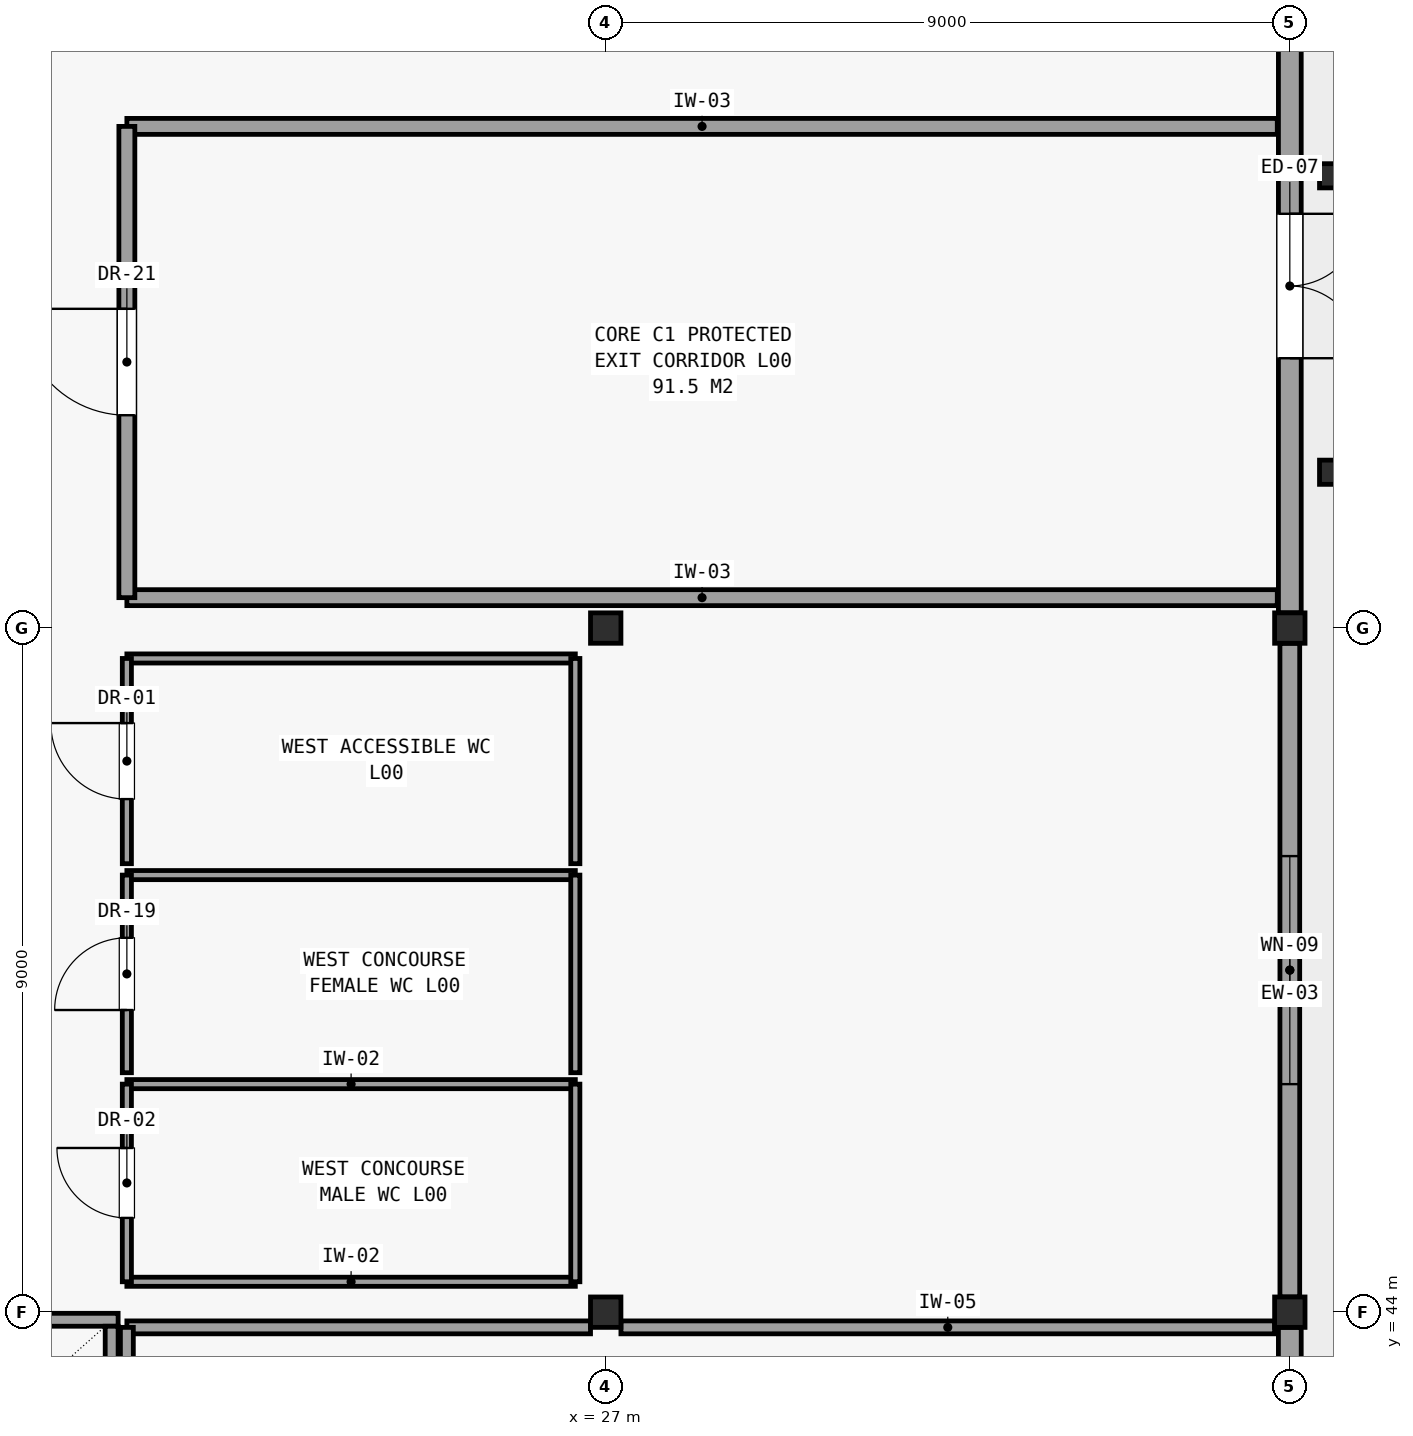
"""IFC4 building model, lengths in metres.
Left out: names, types, materials, properties, quantities, classifications, styles, units other than length and angle.
Written with IfcOpenShell. Run it as: python <this file> out.ifc"""

import sys

from ifc_helpers import new_model, si_unit, direction, frame, frame_2d, origin, origin_2d, place, context, subcontext, project, spatial, rectangle, hollow_rectangle, hollow_circle, extrude, element, fill, save


model = new_model("IFC4")
c1 = context("Model", 3, precision=1e-05, world=origin(), true_north=direction((0.0, 1.0)))
c2 = subcontext(c1, "Body", "Model", "MODEL_VIEW")
j1 = project(units=[si_unit("LENGTHUNIT", "METRE"), si_unit("PLANEANGLEUNIT", "RADIAN")], contexts=[c1])
p1 = place(None, origin())
s1 = spatial("IfcSite", under=j1, at=p1, CompositionType="ELEMENT")
p2 = place(p1, origin())
s2 = spatial("IfcBuilding", under=s1, at=p2, CompositionType="ELEMENT")
p3 = place(p2, origin())
s3 = spatial("IfcBuildingStorey", under=s2, at=p3, CompositionType="ELEMENT", Elevation=0.0)
for number, where, z_axis, x_axis in (
    (1, (27.0, 44.0, 0.0), (0.0, 0.0, 1.0), (1.0, 0.0, 0.0)),
    (2, (27.0, 53.0, 0.0), (0.0, 0.0, 1.0), (1.0, 0.0, 0.0)),
    (3, (36.0, 44.0, 0.0), (0.0, 0.0, 1.0), (1.0, 0.0, 0.0)),
    (4, (36.0, 53.0, 0.0), (0.0, 0.0, 1.0), (1.0, 0.0, 0.0)),
):
    element("IfcColumn", number, at=place(p3, frame(where, z_axis=z_axis, x_axis=x_axis)), inside=s3, PredefinedType="COLUMN", context=c2, shape_type="SweptSolid", body=[
        extrude(hollow_rectangle(XDim=0.4, YDim=0.4, WallThickness=0.019, at=origin_2d()), origin(), (0.0, 0.0, 1.0), 5.1),
    ])
for number, where, z_axis, x_axis in (
    (5, (36.55, 55.05, 0.0), (0.0, 0.0, 1.0), (1.0, 0.0, 0.0)),
    (6, (36.55, 58.95, 0.0), (0.0, 0.0, 1.0), (1.0, 0.0, 0.0)),
):
    element("IfcColumn", number, at=place(p3, frame(where, z_axis=z_axis, x_axis=x_axis)), inside=s3, PredefinedType="COLUMN", context=c2, shape_type="SweptSolid", body=[
        extrude(hollow_circle(Radius=0.159, WallThickness=0.01, at=origin_2d()), origin(), (0.0, 0.0, 1.0), 5.1),
    ])
p4 = place(p3, frame((36.0, 36.2, 0.0), z_axis=(0.0, 0.0, 1.0), x_axis=(0.0, 1.0, 0.0)))
e7 = element("IfcWall", 7, at=p4, inside=s3, PredefinedType="SOLIDWALL", context=c2, shape_type="SweptSolid", body=[
    extrude(rectangle(XDim=7.6, YDim=0.3, at=frame_2d((3.8, 0.0))), origin(), (0.0, 0.0, 1.0), 4.262),
])
p5 = place(p4, frame((4.7, 0.0, 0.0), z_axis=(0.0, 0.0, 1.0), x_axis=(-1.0, 0.0, 0.0)))
e8 = element("IfcOpeningElement", 8, at=p5, cuts=e7, PredefinedType="OPENING", context=c2, shape_type="SweptSolid", body=[
    extrude(rectangle(XDim=1.8, YDim=2.5, at=frame_2d((0.9, 1.25))), frame((0.0, 0.161, 0.0), z_axis=(0.0, -1.0, 0.0), x_axis=(1.0, 0.0, 0.0)), (0.0, 0.0, 1.0), 0.322),
])
p6 = place(p3, frame((36.0, 44.2, 0.0), z_axis=(0.0, 0.0, 1.0), x_axis=(0.0, 1.0, 0.0)))
e9 = element("IfcWall", 9, at=p6, inside=s3, PredefinedType="SOLIDWALL", context=c2, shape_type="SweptSolid", body=[
    extrude(rectangle(XDim=8.6, YDim=0.26, at=frame_2d((4.3, 0.0))), origin(), (0.0, 0.0, 1.0), 4.262),
])
p7 = place(p6, frame((2.8, 0.0, 0.95)))
e10 = element("IfcOpeningElement", 10, at=p7, cuts=e9, PredefinedType="OPENING", context=c2, shape_type="SweptSolid", body=[
    extrude(rectangle(XDim=3.0, YDim=1.4, at=frame_2d((1.5, 0.7))), frame((0.0, 0.141, 0.0), z_axis=(0.0, -1.0, 0.0), x_axis=(1.0, 0.0, 0.0)), (0.0, 0.0, 1.0), 0.282),
])
p8 = place(p3, frame((36.0, 53.2, 0.0), z_axis=(0.0, 0.0, 1.0), x_axis=(0.0, 1.0, 0.0)))
e11 = element("IfcWall", 11, at=p8, inside=s3, PredefinedType="SOLIDWALL", context=c2, shape_type="SweptSolid", body=[
    extrude(rectangle(XDim=8.6, YDim=0.3, at=frame_2d((4.3, 0.0))), origin(), (0.0, 0.0, 1.0), 4.262),
])
p9 = place(p8, frame((5.25, 0.0, 0.0), z_axis=(0.0, 0.0, 1.0), x_axis=(-1.0, 0.0, 0.0)))
e12 = element("IfcOpeningElement", 12, at=p9, cuts=e11, PredefinedType="OPENING", context=c2, shape_type="SweptSolid", body=[
    extrude(rectangle(XDim=1.9, YDim=2.4, at=frame_2d((0.95, 1.2))), frame((0.0, 0.161, 0.0), z_axis=(0.0, -1.0, 0.0), x_axis=(1.0, 0.0, 0.0)), (0.0, 0.0, 1.0), 0.322),
])
p10 = place(p3, frame((18.415, 43.9, 0.0), z_axis=(0.0, 0.0, 1.0), x_axis=(1.0, 0.0, 0.0)))
e13 = element("IfcWall", 13, at=p10, inside=s3, PredefinedType="PARTITIONING", context=c2, shape_type="SweptSolid", body=[
    extrude(rectangle(XDim=2.17, YDim=0.17, at=frame_2d((1.085, 0.0))), origin(), (0.0, 0.0, 1.0), 4.262),
])
p11 = place(p3, frame((20.5, 42.185, 0.0), z_axis=(0.0, 0.0, 1.0), x_axis=(0.0, 1.0, 0.0)))
e14 = element("IfcWall", 14, at=p11, inside=s3, PredefinedType="PARTITIONING", context=c2, shape_type="SweptSolid", body=[
    extrude(rectangle(XDim=1.63, YDim=0.17, at=frame_2d((0.815, 0.0))), origin(), (0.0, 0.0, 1.0), 4.262),
])
for number, where, z_axis, x_axis in (
    (15, (20.7, 44.4, 0.0), (0.0, 0.0, 1.0), (1.0, 0.0, 0.0)),
    (16, (20.7, 47.0, 0.0), (0.0, 0.0, 1.0), (1.0, 0.0, 0.0)),
):
    element("IfcWall", number, at=place(p3, frame(where, z_axis=z_axis, x_axis=x_axis)), inside=s3, PredefinedType="PARTITIONING", context=c2, shape_type="SweptSolid", body=[
        extrude(rectangle(XDim=5.9, YDim=0.12, at=frame_2d((2.95, 0.0))), origin(), (0.0, 0.0, 1.0), 4.85),
    ])
p12 = place(p3, frame((20.7, 44.4, 0.0), z_axis=(0.0, 0.0, 1.0), x_axis=(0.0, 1.0, 0.0)))
e17 = element("IfcWall", 17, at=p12, inside=s3, PredefinedType="PARTITIONING", context=c2, shape_type="SweptSolid", body=[
    extrude(rectangle(XDim=2.6, YDim=0.12, at=frame_2d((1.3, 0.0))), origin(), (0.0, 0.0, 1.0), 4.85),
])
p13 = place(p12, frame((0.84, 0.0, 0.0)))
e18 = element("IfcOpeningElement", 18, at=p13, cuts=e17, PredefinedType="OPENING", context=c2, shape_type="SweptSolid", body=[
    extrude(rectangle(XDim=0.92, YDim=2.1, at=frame_2d((0.46, 1.05))), frame((0.0, 0.071, 0.0), z_axis=(0.0, -1.0, 0.0), x_axis=(1.0, 0.0, 0.0)), (0.0, 0.0, 1.0), 0.142),
])
p14 = place(p3, frame((26.6, 44.4, 0.0), z_axis=(0.0, 0.0, 1.0), x_axis=(0.0, 1.0, 0.0)))
e19 = element("IfcWall", 19, at=p14, inside=s3, PredefinedType="PARTITIONING", context=c2, shape_type="SweptSolid", body=[
    extrude(rectangle(XDim=2.6, YDim=0.12, at=frame_2d((1.3, 0.0))), origin(), (0.0, 0.0, 1.0), 4.85),
])
p15 = place(p3, frame((20.7, 49.75, 0.0), z_axis=(0.0, 0.0, 1.0), x_axis=(1.0, 0.0, 0.0)))
e20 = element("IfcWall", 20, at=p15, inside=s3, PredefinedType="PARTITIONING", context=c2, shape_type="SweptSolid", body=[
    extrude(rectangle(XDim=5.9, YDim=0.12, at=frame_2d((2.95, 0.0))), origin(), (0.0, 0.0, 1.0), 4.85),
])
p16 = place(p3, frame((20.7, 47.15, 0.0), z_axis=(0.0, 0.0, 1.0), x_axis=(0.0, 1.0, 0.0)))
e21 = element("IfcWall", 21, at=p16, inside=s3, PredefinedType="PARTITIONING", context=c2, shape_type="SweptSolid", body=[
    extrude(rectangle(XDim=2.6, YDim=0.12, at=frame_2d((1.3, 0.0))), origin(), (0.0, 0.0, 1.0), 4.6),
])
p17 = place(p16, frame((0.825, 0.0, 0.0)))
e22 = element("IfcOpeningElement", 22, at=p17, cuts=e21, PredefinedType="OPENING", context=c2, shape_type="SweptSolid", body=[
    extrude(rectangle(XDim=0.95, YDim=2.15, at=frame_2d((0.475, 1.075))), frame((0.0, 0.071, 0.0), z_axis=(0.0, -1.0, 0.0), x_axis=(1.0, 0.0, 0.0)), (0.0, 0.0, 1.0), 0.142),
])
p18 = place(p3, frame((26.6, 47.15, 0.0), z_axis=(0.0, 0.0, 1.0), x_axis=(0.0, 1.0, 0.0)))
e23 = element("IfcWall", 23, at=p18, inside=s3, PredefinedType="PARTITIONING", context=c2, shape_type="SweptSolid", body=[
    extrude(rectangle(XDim=2.6, YDim=0.12, at=frame_2d((1.3, 0.0))), origin(), (0.0, 0.0, 1.0), 4.6),
])
p19 = place(p3, frame((20.7, 52.6, 0.0), z_axis=(0.0, 0.0, 1.0), x_axis=(1.0, 0.0, 0.0)))
e24 = element("IfcWall", 24, at=p19, inside=s3, PredefinedType="PARTITIONING", context=c2, shape_type="SweptSolid", body=[
    extrude(rectangle(XDim=5.9, YDim=0.12, at=frame_2d((2.95, 0.0))), origin(), (0.0, 0.0, 1.0), 4.85),
])
p20 = place(p3, frame((20.7, 49.9, 0.0), z_axis=(0.0, 0.0, 1.0), x_axis=(0.0, 1.0, 0.0)))
e25 = element("IfcWall", 25, at=p20, inside=s3, PredefinedType="PARTITIONING", context=c2, shape_type="SweptSolid", body=[
    extrude(rectangle(XDim=2.7, YDim=0.12, at=frame_2d((1.35, 0.0))), origin(), (0.0, 0.0, 1.0), 4.85),
])
p21 = place(p20, frame((0.85, 0.0, 0.0)))
e26 = element("IfcOpeningElement", 26, at=p21, cuts=e25, PredefinedType="OPENING", context=c2, shape_type="SweptSolid", body=[
    extrude(rectangle(XDim=1.0, YDim=2.15, at=frame_2d((0.5, 1.075))), frame((0.0, 0.071, 0.0), z_axis=(0.0, -1.0, 0.0), x_axis=(1.0, 0.0, 0.0)), (0.0, 0.0, 1.0), 0.142),
])
p22 = place(p3, frame((26.6, 49.9, 0.0), z_axis=(0.0, 0.0, 1.0), x_axis=(0.0, 1.0, 0.0)))
e27 = element("IfcWall", 27, at=p22, inside=s3, PredefinedType="PARTITIONING", context=c2, shape_type="SweptSolid", body=[
    extrude(rectangle(XDim=2.7, YDim=0.12, at=frame_2d((1.35, 0.0))), origin(), (0.0, 0.0, 1.0), 4.85),
])
p23 = place(p3, frame((20.7, 43.8, 0.0), z_axis=(0.0, 0.0, 1.0), x_axis=(1.0, 0.0, 0.0)))
e28 = element("IfcWall", 28, at=p23, inside=s3, PredefinedType="PARTITIONING", context=c2, shape_type="SweptSolid", body=[
    extrude(rectangle(XDim=6.1, YDim=0.17, at=frame_2d((3.05, 0.0))), origin(), (0.0, 0.0, 1.0), 4.262),
])
p24 = place(p3, frame((27.2, 43.8, 0.0), z_axis=(0.0, 0.0, 1.0), x_axis=(1.0, 0.0, 0.0)))
e29 = element("IfcWall", 29, at=p24, inside=s3, PredefinedType="PARTITIONING", context=c2, shape_type="SweptSolid", body=[
    extrude(rectangle(XDim=8.6, YDim=0.17, at=frame_2d((4.3, 0.0))), origin(), (0.0, 0.0, 1.0), 4.262),
])
p25 = place(p3, frame((20.7, 36.2, 0.0), z_axis=(0.0, 0.0, 1.0), x_axis=(0.0, 1.0, 0.0)))
e30 = element("IfcWall", 30, at=p25, inside=s3, PredefinedType="PARTITIONING", context=c2, shape_type="SweptSolid", body=[
    extrude(rectangle(XDim=7.6, YDim=0.17, at=frame_2d((3.8, 0.0))), origin(), (0.0, 0.0, 1.0), 4.262),
])
p26 = place(p25, frame((2.96, 0.0, 0.0)))
e31 = element("IfcOpeningElement", 31, at=p26, cuts=e30, PredefinedType="OPENING", context=c2, shape_type="SweptSolid", body=[
    extrude(rectangle(XDim=1.28, YDim=2.3, at=frame_2d((0.64, 1.15))), frame((0.0, 0.096, 0.0), z_axis=(0.0, -1.0, 0.0), x_axis=(1.0, 0.0, 0.0)), (0.0, 0.0, 1.0), 0.192),
])
for number, where, z_axis, x_axis in (
    (32, (20.7, 53.4, 0.0), (0.0, 0.0, 1.0), (1.0, 0.0, 0.0)),
    (33, (20.7, 59.6, 0.0), (0.0, 0.0, 1.0), (1.0, 0.0, 0.0)),
):
    element("IfcWall", number, at=place(p3, frame(where, z_axis=z_axis, x_axis=x_axis)), inside=s3, PredefinedType="PARTITIONING", context=c2, shape_type="SweptSolid", body=[
        extrude(rectangle(XDim=15.135, YDim=0.21, at=frame_2d((7.567, 0.0))), origin(), (0.0, 0.0, 1.0), 4.362),
    ])
p27 = place(p3, frame((20.7, 53.4, 0.0), z_axis=(0.0, 0.0, 1.0), x_axis=(0.0, 1.0, 0.0)))
e34 = element("IfcWall", 34, at=p27, inside=s3, PredefinedType="PARTITIONING", context=c2, shape_type="SweptSolid", body=[
    extrude(rectangle(XDim=6.2, YDim=0.21, at=frame_2d((3.1, 0.0))), origin(), (0.0, 0.0, 1.0), 4.6),
])
p28 = place(p27, frame((2.4, 0.0, 0.0)))
e35 = element("IfcOpeningElement", 35, at=p28, cuts=e34, PredefinedType="OPENING", context=c2, shape_type="SweptSolid", body=[
    extrude(rectangle(XDim=1.4, YDim=2.2, at=frame_2d((0.7, 1.1))), frame((0.0, 0.116, 0.0), z_axis=(0.0, -1.0, 0.0), x_axis=(1.0, 0.0, 0.0)), (0.0, 0.0, 1.0), 0.232),
])
p29 = place(p7, origin())
e36 = element("IfcWindow", 36, at=p29, inside=s3, PartitioningType="SINGLE_PANEL", PredefinedType="WINDOW", context=c2, shape_type="SweptSolid", body=[
    extrude(rectangle(XDim=3.0, YDim=1.4, at=frame_2d((1.5, 0.7))), frame((0.0, 0.03, 0.0), z_axis=(0.0, -1.0, 0.0), x_axis=(1.0, 0.0, 0.0)), (0.0, 0.0, 1.0), 0.06),
])
fill(e10, e36)
p30 = place(p9, origin())
e37 = element("IfcDoor", 37, at=p30, inside=s3, OperationType="SINGLE_SWING_LEFT", PredefinedType="DOOR", context=c2, shape_type="SweptSolid", body=[
    extrude(rectangle(XDim=1.9, YDim=2.4, at=frame_2d((0.95, 1.2))), frame((0.0, 0.025, 0.0), z_axis=(0.0, -1.0, 0.0), x_axis=(1.0, 0.0, 0.0)), (0.0, 0.0, 1.0), 0.05),
])
fill(e12, e37)
p31 = place(p13, origin())
e38 = element("IfcDoor", 38, at=p31, inside=s3, OperationType="SINGLE_SWING_RIGHT", PredefinedType="DOOR", context=c2, shape_type="SweptSolid", body=[
    extrude(rectangle(XDim=0.92, YDim=2.1, at=frame_2d((0.46, 1.05))), frame((0.0, 0.025, 0.0), z_axis=(0.0, -1.0, 0.0), x_axis=(1.0, 0.0, 0.0)), (0.0, 0.0, 1.0), 0.05),
])
fill(e18, e38)
p32 = place(p17, origin())
e39 = element("IfcDoor", 39, at=p32, inside=s3, OperationType="SINGLE_SWING_LEFT", PredefinedType="DOOR", context=c2, shape_type="SweptSolid", body=[
    extrude(rectangle(XDim=0.95, YDim=2.15, at=frame_2d((0.475, 1.075))), frame((0.0, 0.025, 0.0), z_axis=(0.0, -1.0, 0.0), x_axis=(1.0, 0.0, 0.0)), (0.0, 0.0, 1.0), 0.05),
])
fill(e22, e39)
p33 = place(p21, origin())
e40 = element("IfcDoor", 40, at=p33, inside=s3, OperationType="SINGLE_SWING_RIGHT", PredefinedType="DOOR", context=c2, shape_type="SweptSolid", body=[
    extrude(rectangle(XDim=1.0, YDim=2.15, at=frame_2d((0.5, 1.075))), frame((0.0, 0.025, 0.0), z_axis=(0.0, -1.0, 0.0), x_axis=(1.0, 0.0, 0.0)), (0.0, 0.0, 1.0), 0.05),
])
fill(e26, e40)
p34 = place(p28, origin())
e41 = element("IfcDoor", 41, at=p34, inside=s3, OperationType="SINGLE_SWING_RIGHT", PredefinedType="DOOR", context=c2, shape_type="SweptSolid", body=[
    extrude(rectangle(XDim=1.4, YDim=2.2, at=frame_2d((0.7, 1.1))), frame((0.0, 0.025, 0.0), z_axis=(0.0, -1.0, 0.0), x_axis=(1.0, 0.0, 0.0)), (0.0, 0.0, 1.0), 0.05),
])
fill(e35, e41)
save(model, sys.argv[1])
